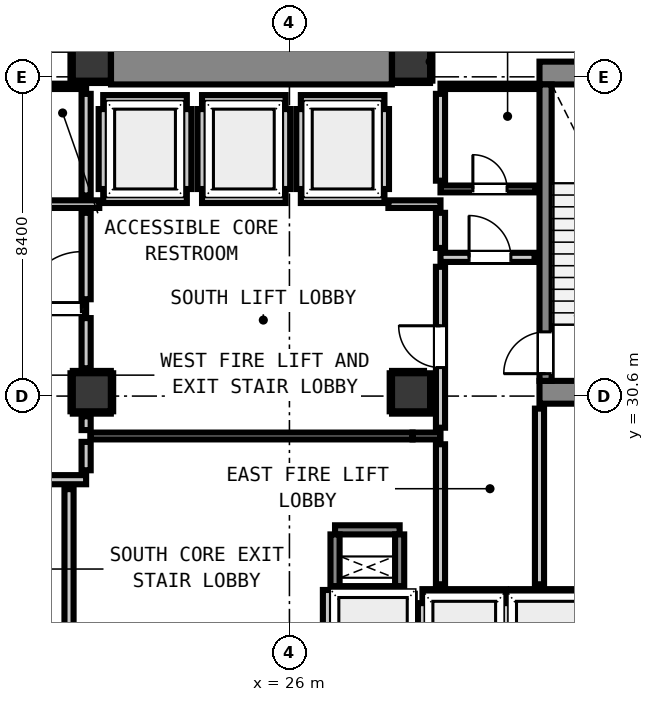
"""IFC4 building model, lengths in metres.
Left out: names, types, materials, properties, quantities, classifications, styles, units other than length and angle.
Written with IfcOpenShell. Run it as: python <this file> out.ifc"""

import sys

from ifc_helpers import new_model, si_unit, direction, frame, frame_2d, origin, origin_2d, place, context, subcontext, project, spatial, rectangle, extrude, element, fill, save


model = new_model("IFC4")
c1 = context("Model", 3, precision=1e-05, world=origin(), true_north=direction((0.0, 1.0)))
c2 = subcontext(c1, "Body", "Model", "MODEL_VIEW")
j1 = project(units=[si_unit("LENGTHUNIT", "METRE"), si_unit("PLANEANGLEUNIT", "RADIAN")], contexts=[c1])
p1 = place(None, origin())
s1 = spatial("IfcSite", under=j1, at=p1, CompositionType="ELEMENT")
p2 = place(p1, origin())
s2 = spatial("IfcBuilding", under=s1, at=p2, CompositionType="ELEMENT")
p3 = place(p2, frame((0.0, 0.0, -4.4)))
s3 = spatial("IfcBuildingStorey", under=s2, at=p3, CompositionType="ELEMENT", Elevation=-4.4)
for number, where, z_axis, x_axis in (
    (1, (20.8, 39.4, 0.0), (0.0, 0.0, 1.0), (1.0, 0.0, 0.0)),
    (2, (29.2, 39.4, 0.0), (0.0, 0.0, 1.0), (1.0, 0.0, 0.0)),
):
    element("IfcColumn", number, at=place(p3, frame(where, z_axis=z_axis, x_axis=x_axis)), inside=s3, PredefinedType="COLUMN", context=c2, shape_type="SweptSolid", body=[
        extrude(rectangle(XDim=1.0, YDim=1.0, at=origin_2d()), origin(), (0.0, 0.0, 1.0), 4.4),
    ])
p4 = place(p3, frame((32.58, 39.1, 0.0), z_axis=(0.0, 0.0, 1.0), x_axis=(1.0, 0.0, 0.0)))
e3 = element("IfcWall", 3, at=p4, inside=s3, PredefinedType="SHEAR", context=c2, shape_type="SweptSolid", body=[
    extrude(rectangle(XDim=4.08, YDim=0.6, at=frame_2d((2.04, 0.0))), origin(), (0.0, 0.0, 1.0), 4.4),
])
p5 = place(p3, frame((32.58, 30.7, 0.0), z_axis=(0.0, 0.0, 1.0), x_axis=(1.0, 0.0, 0.0)))
e4 = element("IfcWall", 4, at=p5, inside=s3, PredefinedType="SHEAR", context=c2, shape_type="SweptSolid", body=[
    extrude(rectangle(XDim=3.415, YDim=0.6, at=frame_2d((1.708, 0.0))), origin(), (0.0, 0.0, 1.0), 4.4),
])
p6 = place(p3, frame((21.305, 39.4, 0.0), z_axis=(0.0, 0.0, 1.0), x_axis=(1.0, 0.0, 0.0)))
e5 = element("IfcWall", 5, at=p6, inside=s3, PredefinedType="SHEAR", context=c2, shape_type="SweptSolid", body=[
    extrude(rectangle(XDim=7.39, YDim=1.2, at=frame_2d((3.695, 0.0))), origin(), (0.0, 0.0, 1.0), 4.4),
])
p7 = place(p3, frame((32.74, 31.0, 0.0), z_axis=(0.0, 0.0, 1.0), x_axis=(0.0, 1.0, 0.0)))
e6 = element("IfcWall", 6, at=p7, inside=s3, PredefinedType="SHEAR", context=c2, shape_type="SweptSolid", body=[
    extrude(rectangle(XDim=7.8, YDim=0.32, at=frame_2d((3.9, 0.0))), origin(), (0.0, 0.0, 1.0), 4.4),
])
p8 = place(p7, frame((0.19, 0.0, 0.0)))
e7 = element("IfcOpeningElement", 7, at=p8, cuts=e6, PredefinedType="OPENING", context=c2, shape_type="SweptSolid", body=[
    extrude(rectangle(XDim=1.1, YDim=2.15, at=frame_2d((0.55, 1.075))), frame((0.0, 0.17, 0.0), z_axis=(0.0, -1.0, 0.0), x_axis=(1.0, 0.0, 0.0)), (0.0, 0.0, 1.0), 0.34),
])
for number, where, z_axis, x_axis in (
    (8, (27.2, 25.48, 0.0), (0.0, 0.0, 1.0), (1.0, 0.0, 0.0)),
    (9, (27.2, 27.08, 0.0), (0.0, 0.0, 1.0), (1.0, 0.0, 0.0)),
):
    element("IfcWall", number, at=place(p3, frame(where, z_axis=z_axis, x_axis=x_axis)), inside=s3, PredefinedType="SHEAR", context=c2, shape_type="SweptSolid", body=[
        extrude(rectangle(XDim=1.7, YDim=0.24, at=frame_2d((0.85, 0.0))), origin(), (0.0, 0.0, 1.0), 4.4),
    ])
for number, where, z_axis, x_axis in (
    (10, (27.2, 25.6, 0.0), (0.0, 0.0, 1.0), (0.0, 1.0, 0.0)),
    (11, (28.9, 25.6, 0.0), (0.0, 0.0, 1.0), (0.0, 1.0, 0.0)),
):
    element("IfcWall", number, at=place(p3, frame(where, z_axis=z_axis, x_axis=x_axis)), inside=s3, PredefinedType="SHEAR", context=c2, shape_type="SweptSolid", body=[
        extrude(rectangle(XDim=1.36, YDim=0.24, at=frame_2d((0.68, 0.0))), origin(), (0.0, 0.0, 1.0), 4.4),
    ])
for number, where, z_axis, x_axis in (
    (12, (20.8, 30.7, 0.0), (0.0, 0.0, 1.0), (1.0, 0.0, 0.0)),
    (13, (29.2, 30.7, 0.0), (0.0, 0.0, 1.0), (1.0, 0.0, 0.0)),
):
    element("IfcColumn", number, at=place(p3, frame(where, z_axis=z_axis, x_axis=x_axis)), inside=s3, PredefinedType="COLUMN", context=c2, shape_type="SweptSolid", body=[
        extrude(rectangle(XDim=1.0, YDim=1.0, at=origin_2d()), origin(), (0.0, 0.0, 1.0), 4.4),
    ])
for number, where, z_axis, x_axis in (
    (14, (21.1, 35.8, 0.0), (0.0, 0.0, 1.0), (1.0, 0.0, 0.0)),
    (15, (21.1, 38.4, 0.0), (0.0, 0.0, 1.0), (1.0, 0.0, 0.0)),
):
    element("IfcWall", number, at=place(p3, frame(where, z_axis=z_axis, x_axis=x_axis)), inside=s3, PredefinedType="PARTITIONING", context=c2, shape_type="SweptSolid", body=[
        extrude(rectangle(XDim=2.2, YDim=0.24, at=frame_2d((1.1, 0.0))), origin(), (0.0, 0.0, 1.0), 3.98),
    ])
p9 = place(p3, frame((21.1, 36.048, 0.0), z_axis=(0.0, 0.0, 1.0), x_axis=(0.0, 1.0, 0.0)))
e16 = element("IfcWall", 16, at=p9, inside=s3, PredefinedType="PARTITIONING", context=c2, shape_type="SweptSolid", body=[
    extrude(rectangle(XDim=2.104, YDim=0.24, at=frame_2d((1.052, 0.0))), origin(), (0.0, 0.0, 1.0), 3.015),
])
p10 = place(p3, frame((23.3, 36.048, 0.0), z_axis=(0.0, 0.0, 1.0), x_axis=(0.0, 1.0, 0.0)))
e17 = element("IfcWall", 17, at=p10, inside=s3, PredefinedType="PARTITIONING", context=c2, shape_type="SweptSolid", body=[
    extrude(rectangle(XDim=2.104, YDim=0.24, at=frame_2d((1.052, 0.0))), origin(), (0.0, 0.0, 1.0), 3.98),
])
for number, where, z_axis, x_axis in (
    (18, (23.7, 35.8, 0.0), (0.0, 0.0, 1.0), (1.0, 0.0, 0.0)),
    (19, (23.7, 38.4, 0.0), (0.0, 0.0, 1.0), (1.0, 0.0, 0.0)),
):
    element("IfcWall", number, at=place(p3, frame(where, z_axis=z_axis, x_axis=x_axis)), inside=s3, PredefinedType="PARTITIONING", context=c2, shape_type="SweptSolid", body=[
        extrude(rectangle(XDim=2.2, YDim=0.24, at=frame_2d((1.1, 0.0))), origin(), (0.0, 0.0, 1.0), 3.98),
    ])
for number, where, z_axis, x_axis in (
    (20, (23.7, 36.048, 0.0), (0.0, 0.0, 1.0), (0.0, 1.0, 0.0)),
    (21, (25.9, 36.048, 0.0), (0.0, 0.0, 1.0), (0.0, 1.0, 0.0)),
):
    element("IfcWall", number, at=place(p3, frame(where, z_axis=z_axis, x_axis=x_axis)), inside=s3, PredefinedType="PARTITIONING", context=c2, shape_type="SweptSolid", body=[
        extrude(rectangle(XDim=2.104, YDim=0.24, at=frame_2d((1.052, 0.0))), origin(), (0.0, 0.0, 1.0), 3.98),
    ])
for number, where, z_axis, x_axis in (
    (22, (26.3, 35.8, 0.0), (0.0, 0.0, 1.0), (1.0, 0.0, 0.0)),
    (23, (26.3, 38.4, 0.0), (0.0, 0.0, 1.0), (1.0, 0.0, 0.0)),
):
    element("IfcWall", number, at=place(p3, frame(where, z_axis=z_axis, x_axis=x_axis)), inside=s3, PredefinedType="PARTITIONING", context=c2, shape_type="SweptSolid", body=[
        extrude(rectangle(XDim=2.2, YDim=0.24, at=frame_2d((1.1, 0.0))), origin(), (0.0, 0.0, 1.0), 3.98),
    ])
for number, where, z_axis, x_axis in (
    (24, (26.3, 36.048, 0.0), (0.0, 0.0, 1.0), (0.0, 1.0, 0.0)),
    (25, (28.5, 36.048, 0.0), (0.0, 0.0, 1.0), (0.0, 1.0, 0.0)),
):
    element("IfcWall", number, at=place(p3, frame(where, z_axis=z_axis, x_axis=x_axis)), inside=s3, PredefinedType="PARTITIONING", context=c2, shape_type="SweptSolid", body=[
        extrude(rectangle(XDim=2.104, YDim=0.24, at=frame_2d((1.052, 0.0))), origin(), (0.0, 0.0, 1.0), 3.98),
    ])
p11 = place(p3, frame((29.5, 25.4, 0.0), z_axis=(0.0, 0.0, 1.0), x_axis=(1.0, 0.0, 0.0)))
e26 = element("IfcWall", 26, at=p11, inside=s3, PredefinedType="PARTITIONING", context=c2, shape_type="SweptSolid", body=[
    extrude(rectangle(XDim=2.2, YDim=0.24, at=frame_2d((1.1, 0.0))), origin(), (0.0, 0.0, 1.0), 3.98),
])
p12 = place(p3, frame((29.5, 22.632, 0.0), z_axis=(0.0, 0.0, 1.0), x_axis=(0.0, 1.0, 0.0)))
e27 = element("IfcWall", 27, at=p12, inside=s3, PredefinedType="PARTITIONING", context=c2, shape_type="SweptSolid", body=[
    extrude(rectangle(XDim=2.52, YDim=0.24, at=frame_2d((1.26, 0.0))), origin(), (0.0, 0.0, 1.0), 3.015),
])
p13 = place(p3, frame((31.7, 22.73, 0.0), z_axis=(0.0, 0.0, 1.0), x_axis=(0.0, 1.0, 0.0)))
e28 = element("IfcWall", 28, at=p13, inside=s3, PredefinedType="PARTITIONING", context=c2, shape_type="SweptSolid", body=[
    extrude(rectangle(XDim=2.422, YDim=0.24, at=frame_2d((1.211, 0.0))), origin(), (0.0, 0.0, 1.0), 3.98),
])
p14 = place(p3, frame((31.828, 25.4, 0.0), z_axis=(0.0, 0.0, 1.0), x_axis=(1.0, 0.0, 0.0)))
e29 = element("IfcWall", 29, at=p14, inside=s3, PredefinedType="PARTITIONING", context=c2, shape_type="SweptSolid", body=[
    extrude(rectangle(XDim=2.072, YDim=0.24, at=frame_2d((1.036, 0.0))), origin(), (0.0, 0.0, 1.0), 3.98),
])
p15 = place(p3, frame((27.0, 22.73, 0.0), z_axis=(0.0, 0.0, 1.0), x_axis=(0.0, 1.0, 0.0)))
e30 = element("IfcWall", 30, at=p15, inside=s3, PredefinedType="PARTITIONING", context=c2, shape_type="SweptSolid", body=[
    extrude(rectangle(XDim=2.768, YDim=0.24, at=frame_2d((1.384, 0.0))), origin(), (0.0, 0.0, 1.0), 3.98),
])
p16 = place(p3, frame((17.45, 28.4, 0.0), z_axis=(0.0, 0.0, 1.0), x_axis=(1.0, 0.0, 0.0)))
e31 = element("IfcWall", 31, at=p16, inside=s3, PredefinedType="PARTITIONING", context=c2, shape_type="SweptSolid", body=[
    extrude(rectangle(XDim=3.2, YDim=0.24, at=frame_2d((1.6, 0.0))), origin(), (0.0, 0.0, 1.0), 3.98),
])
p17 = place(p16, frame((0.784, 0.0, 0.0)))
e32 = element("IfcOpeningElement", 32, at=p17, cuts=e31, PredefinedType="OPENING", context=c2, shape_type="SweptSolid", body=[
    extrude(rectangle(XDim=1.1, YDim=2.15, at=frame_2d((0.55, 1.075))), frame((0.0, 0.13, 0.0), z_axis=(0.0, -1.0, 0.0), x_axis=(1.0, 0.0, 0.0)), (0.0, 0.0, 1.0), 0.26),
])
p18 = place(p3, frame((17.45, 32.9, 0.0), z_axis=(0.0, 0.0, 1.0), x_axis=(1.0, 0.0, 0.0)))
e33 = element("IfcWall", 33, at=p18, inside=s3, PredefinedType="PARTITIONING", context=c2, shape_type="SweptSolid", body=[
    extrude(rectangle(XDim=3.2, YDim=0.24, at=frame_2d((1.6, 0.0))), origin(), (0.0, 0.0, 1.0), 3.98),
])
p19 = place(p18, frame((0.159, 0.0, 0.0)))
e34 = element("IfcOpeningElement", 34, at=p19, cuts=e33, PredefinedType="OPENING", context=c2, shape_type="SweptSolid", body=[
    extrude(rectangle(XDim=1.1, YDim=2.15, at=frame_2d((0.55, 1.075))), frame((0.0, 0.13, 0.0), z_axis=(0.0, -1.0, 0.0), x_axis=(1.0, 0.0, 0.0)), (0.0, 0.0, 1.0), 0.26),
])
p20 = place(p18, frame((1.576, 0.0, 0.0)))
e35 = element("IfcOpeningElement", 35, at=p20, cuts=e33, PredefinedType="OPENING", context=c2, shape_type="SweptSolid", body=[
    extrude(rectangle(XDim=1.5, YDim=2.15, at=frame_2d((0.75, 1.075))), frame((0.0, 0.13, 0.0), z_axis=(0.0, -1.0, 0.0), x_axis=(1.0, 0.0, 0.0)), (0.0, 0.0, 1.0), 0.26),
])
p21 = place(p3, frame((29.975, 34.25, 0.0), z_axis=(0.0, 0.0, 1.0), x_axis=(1.0, 0.0, 0.0)))
e36 = element("IfcWall", 36, at=p21, inside=s3, PredefinedType="PARTITIONING", context=c2, shape_type="SweptSolid", body=[
    extrude(rectangle(XDim=2.475, YDim=0.24, at=frame_2d((1.237, 0.0))), origin(), (0.0, 0.0, 1.0), 3.98),
])
p22 = place(p21, frame((0.752, 0.0, 0.0)))
e37 = element("IfcOpeningElement", 37, at=p22, cuts=e36, PredefinedType="OPENING", context=c2, shape_type="SweptSolid", body=[
    extrude(rectangle(XDim=1.1, YDim=2.15, at=frame_2d((0.55, 1.075))), frame((0.0, 0.13, 0.0), z_axis=(0.0, -1.0, 0.0), x_axis=(1.0, 0.0, 0.0)), (0.0, 0.0, 1.0), 0.26),
])
p23 = place(p3, frame((18.95, 35.65, 0.0), z_axis=(0.0, 0.0, 1.0), x_axis=(1.0, 0.0, 0.0)))
e38 = element("IfcWall", 38, at=p23, inside=s3, PredefinedType="PARTITIONING", context=c2, shape_type="SweptSolid", body=[
    extrude(rectangle(XDim=2.046, YDim=0.2, at=frame_2d((1.023, 0.0))), origin(), (0.0, 0.0, 1.0), 3.98),
])
p24 = place(p3, frame((28.604, 35.65, 0.0), z_axis=(0.0, 0.0, 1.0), x_axis=(1.0, 0.0, 0.0)))
e39 = element("IfcWall", 39, at=p24, inside=s3, PredefinedType="PARTITIONING", context=c2, shape_type="SweptSolid", body=[
    extrude(rectangle(XDim=1.371, YDim=0.2, at=frame_2d((0.686, 0.0))), origin(), (0.0, 0.0, 1.0), 3.98),
])
p25 = place(p3, frame((20.76, 29.55, 0.0), z_axis=(0.0, 0.0, 1.0), x_axis=(1.0, 0.0, 0.0)))
e40 = element("IfcWall", 40, at=p25, inside=s3, PredefinedType="PARTITIONING", context=c2, shape_type="SweptSolid", body=[
    extrude(rectangle(XDim=8.48, YDim=0.18, at=frame_2d((4.24, 0.0))), origin(), (0.0, 0.0, 1.0), 3.015),
])
p26 = place(p3, frame((29.24, 29.55, 0.0), z_axis=(0.0, 0.0, 1.0), x_axis=(1.0, 0.0, 0.0)))
e41 = element("IfcWall", 41, at=p26, inside=s3, PredefinedType="PARTITIONING", context=c2, shape_type="SweptSolid", body=[
    extrude(rectangle(XDim=0.735, YDim=0.18, at=frame_2d((0.368, 0.0))), origin(), (0.0, 0.0, 1.0), 3.98),
])
p27 = place(p3, frame((29.975, 36.05, 0.0), z_axis=(0.0, 0.0, 1.0), x_axis=(1.0, 0.0, 0.0)))
e42 = element("IfcWall", 42, at=p27, inside=s3, PredefinedType="PARTITIONING", context=c2, shape_type="SweptSolid", body=[
    extrude(rectangle(XDim=2.505, YDim=0.18, at=frame_2d((1.252, 0.0))), origin(), (0.0, 0.0, 1.0), 3.98),
])
p28 = place(p27, frame((0.852, 0.0, 0.0)))
e43 = element("IfcOpeningElement", 43, at=p28, cuts=e42, PredefinedType="OPENING", context=c2, shape_type="SweptSolid", body=[
    extrude(rectangle(XDim=0.9, YDim=2.1, at=frame_2d((0.45, 1.05))), frame((0.0, 0.1, 0.0), z_axis=(0.0, -1.0, 0.0), x_axis=(1.0, 0.0, 0.0)), (0.0, 0.0, 1.0), 0.2),
])
p29 = place(p3, frame((18.95, 38.75, 0.0), z_axis=(0.0, 0.0, 1.0), x_axis=(1.0, 0.0, 0.0)))
e44 = element("IfcWall", 44, at=p29, inside=s3, PredefinedType="PARTITIONING", context=c2, shape_type="SweptSolid", body=[
    extrude(rectangle(XDim=1.7, YDim=0.14, at=frame_2d((0.85, 0.0))), origin(), (0.0, 0.0, 1.0), 3.98),
])
p30 = place(p3, frame((29.975, 38.75, 0.0), z_axis=(0.0, 0.0, 1.0), x_axis=(1.0, 0.0, 0.0)))
e45 = element("IfcWall", 45, at=p30, inside=s3, PredefinedType="PARTITIONING", context=c2, shape_type="SweptSolid", body=[
    extrude(rectangle(XDim=2.525, YDim=0.14, at=frame_2d((1.262, 0.0))), origin(), (0.0, 0.0, 1.0), 3.98),
])
p31 = place(p3, frame((20.2, 22.586, 0.0), z_axis=(0.0, 0.0, 1.0), x_axis=(0.0, 1.0, 0.0)))
e46 = element("IfcWall", 46, at=p31, inside=s3, PredefinedType="PARTITIONING", context=c2, shape_type="SweptSolid", body=[
    extrude(rectangle(XDim=5.566, YDim=0.24, at=frame_2d((2.783, 0.0))), origin(), (0.0, 0.0, 1.0), 3.98),
])
p32 = place(p3, frame((20.65, 28.648, 0.0), z_axis=(0.0, 0.0, 1.0), x_axis=(0.0, 1.0, 0.0)))
e47 = element("IfcWall", 47, at=p32, inside=s3, PredefinedType="PARTITIONING", context=c2, shape_type="SweptSolid", body=[
    extrude(rectangle(XDim=0.747, YDim=0.24, at=frame_2d((0.374, 0.0))), origin(), (0.0, 0.0, 1.0), 3.015),
])
p33 = place(p3, frame((20.65, 29.705, 0.0), z_axis=(0.0, 0.0, 1.0), x_axis=(0.0, 1.0, 0.0)))
e48 = element("IfcWall", 48, at=p33, inside=s3, PredefinedType="PARTITIONING", context=c2, shape_type="SweptSolid", body=[
    extrude(rectangle(XDim=0.363, YDim=0.24, at=frame_2d((0.182, 0.0))), origin(), (0.0, 0.0, 1.0), 3.015),
])
p34 = place(p3, frame((20.65, 31.332, 0.0), z_axis=(0.0, 0.0, 1.0), x_axis=(0.0, 1.0, 0.0)))
e49 = element("IfcWall", 49, at=p34, inside=s3, PredefinedType="PARTITIONING", context=c2, shape_type="SweptSolid", body=[
    extrude(rectangle(XDim=1.32, YDim=0.24, at=frame_2d((0.66, 0.0))), origin(), (0.0, 0.0, 1.0), 3.015),
])
p35 = place(p3, frame((20.65, 33.148, 0.0), z_axis=(0.0, 0.0, 1.0), x_axis=(0.0, 1.0, 0.0)))
e50 = element("IfcWall", 50, at=p35, inside=s3, PredefinedType="PARTITIONING", context=c2, shape_type="SweptSolid", body=[
    extrude(rectangle(XDim=2.274, YDim=0.24, at=frame_2d((1.137, 0.0))), origin(), (0.0, 0.0, 1.0), 3.015),
])
p36 = place(p3, frame((20.65, 35.878, 0.0), z_axis=(0.0, 0.0, 1.0), x_axis=(0.0, 1.0, 0.0)))
e51 = element("IfcWall", 51, at=p36, inside=s3, PredefinedType="PARTITIONING", context=c2, shape_type="SweptSolid", body=[
    extrude(rectangle(XDim=2.674, YDim=0.24, at=frame_2d((1.337, 0.0))), origin(), (0.0, 0.0, 1.0), 3.015),
])
p37 = place(p3, frame((29.975, 25.648, 0.0), z_axis=(0.0, 0.0, 1.0), x_axis=(0.0, 1.0, 0.0)))
e52 = element("IfcWall", 52, at=p37, inside=s3, PredefinedType="PARTITIONING", context=c2, shape_type="SweptSolid", body=[
    extrude(rectangle(XDim=3.684, YDim=0.24, at=frame_2d((1.842, 0.0))), origin(), (0.0, 0.0, 1.0), 3.98),
])
p38 = place(p3, frame((29.975, 29.768, 0.0), z_axis=(0.0, 0.0, 1.0), x_axis=(0.0, 1.0, 0.0)))
e53 = element("IfcWall", 53, at=p38, inside=s3, PredefinedType="PARTITIONING", context=c2, shape_type="SweptSolid", body=[
    extrude(rectangle(XDim=4.234, YDim=0.24, at=frame_2d((2.117, 0.0))), origin(), (0.0, 0.0, 1.0), 3.98),
])
p39 = place(p38, frame((1.582, 0.0, 0.0)))
e54 = element("IfcOpeningElement", 54, at=p39, cuts=e53, PredefinedType="OPENING", context=c2, shape_type="SweptSolid", body=[
    extrude(rectangle(XDim=1.1, YDim=2.15, at=frame_2d((0.55, 1.075))), frame((0.0, 0.13, 0.0), z_axis=(0.0, -1.0, 0.0), x_axis=(1.0, 0.0, 0.0)), (0.0, 0.0, 1.0), 0.26),
])
p40 = place(p3, frame((29.975, 34.498, 0.0), z_axis=(0.0, 0.0, 1.0), x_axis=(0.0, 1.0, 0.0)))
e55 = element("IfcWall", 55, at=p40, inside=s3, PredefinedType="PARTITIONING", context=c2, shape_type="SweptSolid", body=[
    extrude(rectangle(XDim=0.924, YDim=0.24, at=frame_2d((0.462, 0.0))), origin(), (0.0, 0.0, 1.0), 3.98),
])
p41 = place(p3, frame((29.975, 36.268, 0.0), z_axis=(0.0, 0.0, 1.0), x_axis=(0.0, 1.0, 0.0)))
e56 = element("IfcWall", 56, at=p41, inside=s3, PredefinedType="PARTITIONING", context=c2, shape_type="SweptSolid", body=[
    extrude(rectangle(XDim=2.284, YDim=0.24, at=frame_2d((1.142, 0.0))), origin(), (0.0, 0.0, 1.0), 3.98),
])
p42 = place(p3, frame((32.58, 25.648, 0.0), z_axis=(0.0, 0.0, 1.0), x_axis=(0.0, 1.0, 0.0)))
e57 = element("IfcWall", 57, at=p42, inside=s3, PredefinedType="PARTITIONING", context=c2, shape_type="SweptSolid", body=[
    extrude(rectangle(XDim=4.622, YDim=0.24, at=frame_2d((2.311, 0.0))), origin(), (0.0, 0.0, 1.0), 3.98),
])
p43 = place(p3, frame((20.3, 38.868, 0.0), z_axis=(0.0, 0.0, 1.0), x_axis=(1.0, 0.0, 0.0)))
e58 = element("IfcWall", 58, at=p43, inside=s3, PredefinedType="PARTITIONING", context=c2, shape_type="SweptSolid", body=[
    extrude(rectangle(XDim=0.99, YDim=0.06, at=frame_2d((0.495, 0.0))), origin(), (0.0, 0.0, 1.0), 1.45),
])
p44 = place(p3, frame((20.268, 38.9, 0.0), z_axis=(0.0, 0.0, 1.0), x_axis=(0.0, 1.0, 0.0)))
e59 = element("IfcWall", 59, at=p44, inside=s3, PredefinedType="PARTITIONING", context=c2, shape_type="SweptSolid", body=[
    extrude(rectangle(XDim=1.0, YDim=0.06, at=frame_2d((0.5, 0.0))), origin(), (0.0, 0.0, 1.0), 1.45),
])
p45 = place(p3, frame((28.71, 38.868, 0.0), z_axis=(0.0, 0.0, 1.0), x_axis=(1.0, 0.0, 0.0)))
e60 = element("IfcWall", 60, at=p45, inside=s3, PredefinedType="PARTITIONING", context=c2, shape_type="SweptSolid", body=[
    extrude(rectangle(XDim=0.99, YDim=0.06, at=frame_2d((0.495, 0.0))), origin(), (0.0, 0.0, 1.0), 1.45),
])
for number, where, z_axis, x_axis in (
    (61, (29.732, 38.9, 0.0), (0.0, 0.0, 1.0), (0.0, 1.0, 0.0)),
    (62, (20.3, 30.168, 0.0), (0.0, 0.0, 1.0), (1.0, 0.0, 0.0)),
    (63, (20.3, 31.232, 0.0), (0.0, 0.0, 1.0), (1.0, 0.0, 0.0)),
    (64, (20.268, 30.2, 0.0), (0.0, 0.0, 1.0), (0.0, 1.0, 0.0)),
    (65, (21.332, 30.2, 0.0), (0.0, 0.0, 1.0), (0.0, 1.0, 0.0)),
    (66, (28.7, 30.168, 0.0), (0.0, 0.0, 1.0), (1.0, 0.0, 0.0)),
):
    element("IfcWall", number, at=place(p3, frame(where, z_axis=z_axis, x_axis=x_axis)), inside=s3, PredefinedType="PARTITIONING", context=c2, shape_type="SweptSolid", body=[
        extrude(rectangle(XDim=1.0, YDim=0.06, at=frame_2d((0.5, 0.0))), origin(), (0.0, 0.0, 1.0), 1.45),
    ])
p46 = place(p3, frame((28.7, 31.232, 0.0), z_axis=(0.0, 0.0, 1.0), x_axis=(1.0, 0.0, 0.0)))
e67 = element("IfcWall", 67, at=p46, inside=s3, PredefinedType="PARTITIONING", context=c2, shape_type="SweptSolid", body=[
    extrude(rectangle(XDim=0.841, YDim=0.06, at=frame_2d((0.42, 0.0))), origin(), (0.0, 0.0, 1.0), 1.45),
])
p47 = place(p3, frame((28.668, 30.2, 0.0), z_axis=(0.0, 0.0, 1.0), x_axis=(0.0, 1.0, 0.0)))
e68 = element("IfcWall", 68, at=p47, inside=s3, PredefinedType="PARTITIONING", context=c2, shape_type="SweptSolid", body=[
    extrude(rectangle(XDim=1.0, YDim=0.06, at=frame_2d((0.5, 0.0))), origin(), (0.0, 0.0, 1.0), 1.45),
])
p48 = place(p3, frame((29.732, 30.2, 0.0), z_axis=(0.0, 0.0, 1.0), x_axis=(0.0, 1.0, 0.0)))
e69 = element("IfcWall", 69, at=p48, inside=s3, PredefinedType="PARTITIONING", context=c2, shape_type="SweptSolid", body=[
    extrude(rectangle(XDim=0.772, YDim=0.06, at=frame_2d((0.386, 0.0))), origin(), (0.0, 0.0, 1.0), 1.45),
])
p49 = place(p8, origin())
e70 = element("IfcDoor", 70, at=p49, inside=s3, OperationType="SINGLE_SWING_LEFT", PredefinedType="DOOR", context=c2, shape_type="SweptSolid", body=[
    extrude(rectangle(XDim=1.1, YDim=2.15, at=frame_2d((0.55, 1.075))), frame((0.0, 0.025, 0.0), z_axis=(0.0, -1.0, 0.0), x_axis=(1.0, 0.0, 0.0)), (0.0, 0.0, 1.0), 0.05),
])
fill(e7, e70)
p50 = place(p39, origin())
e71 = element("IfcDoor", 71, at=p50, inside=s3, OperationType="SINGLE_SWING_RIGHT", PredefinedType="DOOR", context=c2, shape_type="SweptSolid", body=[
    extrude(rectangle(XDim=1.1, YDim=2.15, at=frame_2d((0.55, 1.075))), frame((0.0, 0.025, 0.0), z_axis=(0.0, -1.0, 0.0), x_axis=(1.0, 0.0, 0.0)), (0.0, 0.0, 1.0), 0.05),
])
fill(e54, e71)
p51 = place(p22, origin())
e72 = element("IfcDoor", 72, at=p51, inside=s3, OperationType="SINGLE_SWING_LEFT", PredefinedType="DOOR", context=c2, shape_type="SweptSolid", body=[
    extrude(rectangle(XDim=1.1, YDim=2.15, at=frame_2d((0.55, 1.075))), frame((0.0, 0.025, 0.0), z_axis=(0.0, -1.0, 0.0), x_axis=(1.0, 0.0, 0.0)), (0.0, 0.0, 1.0), 0.05),
])
fill(e37, e72)
p52 = place(p20, origin())
e73 = element("IfcDoor", 73, at=p52, inside=s3, OperationType="SINGLE_SWING_RIGHT", PredefinedType="DOOR", context=c2, shape_type="SweptSolid", body=[
    extrude(rectangle(XDim=1.5, YDim=2.15, at=frame_2d((0.75, 1.075))), frame((0.0, 0.025, 0.0), z_axis=(0.0, -1.0, 0.0), x_axis=(1.0, 0.0, 0.0)), (0.0, 0.0, 1.0), 0.05),
])
fill(e35, e73)
p53 = place(p28, origin())
e74 = element("IfcDoor", 74, at=p53, inside=s3, OperationType="SINGLE_SWING_LEFT", PredefinedType="DOOR", context=c2, shape_type="SweptSolid", body=[
    extrude(rectangle(XDim=0.9, YDim=2.1, at=frame_2d((0.45, 1.05))), frame((0.0, 0.025, 0.0), z_axis=(0.0, -1.0, 0.0), x_axis=(1.0, 0.0, 0.0)), (0.0, 0.0, 1.0), 0.05),
])
fill(e43, e74)
save(model, sys.argv[1])
